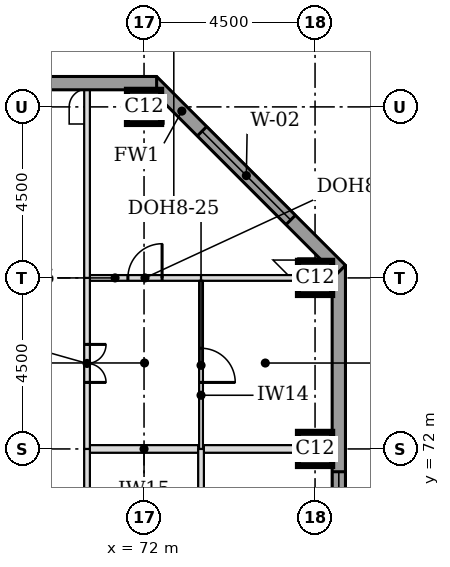
"""IFC4 building model, lengths in metres.
Left out: names, types, materials, properties, quantities, classifications, styles, units other than length and angle.
Written with IfcOpenShell. Run it as: python <this file> out.ifc"""

import sys

from ifc_helpers import new_model, si_unit, direction, frame, frame_2d, origin, origin_2d, place, context, subcontext, project, spatial, rectangle, extrude, element, fill, save


model = new_model("IFC4")
c1 = context("Model", 3, precision=1e-05, world=origin(), true_north=direction((0.0, 1.0)))
c2 = subcontext(c1, "Body", "Model", "MODEL_VIEW")
j1 = project(units=[si_unit("LENGTHUNIT", "METRE"), si_unit("PLANEANGLEUNIT", "RADIAN")], contexts=[c1])
p1 = place(None, origin())
s1 = spatial("IfcSite", under=j1, at=p1, CompositionType="ELEMENT")
p2 = place(p1, origin())
s2 = spatial("IfcBuilding", under=s1, at=p2, CompositionType="ELEMENT")
p3 = place(p2, frame((0.0, 0.0, 199.5)))
s3 = spatial("IfcBuildingStorey", under=s2, at=p3, CompositionType="ELEMENT", Elevation=199.5)
for number, where, z_axis, x_axis in (
    (1, (76.5, 72.0, 0.0), (0.0, 0.0, 1.0), (1.0, 0.0, 0.0)),
    (2, (76.5, 76.5, 0.0), (0.0, 0.0, 1.0), (1.0, 0.0, 0.0)),
    (3, (72.0, 81.0, 0.0), (0.0, 0.0, 1.0), (1.0, 0.0, 0.0)),
):
    element("IfcColumn", number, at=place(p3, frame(where, z_axis=z_axis, x_axis=x_axis)), inside=s3, PredefinedType="COLUMN", context=c2, shape_type="SweptSolid", body=[
        extrude(rectangle(XDim=0.9, YDim=0.9, at=origin_2d()), origin(), (0.0, 0.0, 1.0), 3.7),
    ])
p4 = place(p3, frame((77.125, 44.669, 0.0), z_axis=(0.0, 0.0, 1.0), x_axis=(0.0, 1.0, 0.0)))
e4 = element("IfcWall", 4, at=p4, inside=s3, PredefinedType="STANDARD", context=c2, shape_type="SweptSolid", body=[
    extrude(rectangle(XDim=32.163, YDim=0.35, at=frame_2d((16.081, 0.0))), origin(), (0.0, 0.0, 1.0), 3.525),
])
p5 = place(p4, frame((5.431, 0.0, 0.9)))
e5 = element("IfcOpeningElement", 5, at=p5, cuts=e4, PredefinedType="OPENING", context=c2, shape_type="SweptSolid", body=[
    extrude(rectangle(XDim=3.3, YDim=1.9, at=frame_2d((1.65, 0.95))), frame((0.0, 0.185, 0.0), z_axis=(0.0, -1.0, 0.0), x_axis=(1.0, 0.0, 0.0)), (0.0, 0.0, 1.0), 0.37),
])
p6 = place(p4, frame((9.931, 0.0, 0.9)))
e6 = element("IfcOpeningElement", 6, at=p6, cuts=e4, PredefinedType="OPENING", context=c2, shape_type="SweptSolid", body=[
    extrude(rectangle(XDim=3.3, YDim=1.9, at=frame_2d((1.65, 0.95))), frame((0.0, 0.185, 0.0), z_axis=(0.0, -1.0, 0.0), x_axis=(1.0, 0.0, 0.0)), (0.0, 0.0, 1.0), 0.37),
])
p7 = place(p4, frame((14.431, 0.0, 0.9)))
e7 = element("IfcOpeningElement", 7, at=p7, cuts=e4, PredefinedType="OPENING", context=c2, shape_type="SweptSolid", body=[
    extrude(rectangle(XDim=3.3, YDim=1.9, at=frame_2d((1.65, 0.95))), frame((0.0, 0.185, 0.0), z_axis=(0.0, -1.0, 0.0), x_axis=(1.0, 0.0, 0.0)), (0.0, 0.0, 1.0), 0.37),
])
p8 = place(p4, frame((18.931, 0.0, 0.9)))
e8 = element("IfcOpeningElement", 8, at=p8, cuts=e4, PredefinedType="OPENING", context=c2, shape_type="SweptSolid", body=[
    extrude(rectangle(XDim=3.3, YDim=1.9, at=frame_2d((1.65, 0.95))), frame((0.0, 0.185, 0.0), z_axis=(0.0, -1.0, 0.0), x_axis=(1.0, 0.0, 0.0)), (0.0, 0.0, 1.0), 0.37),
])
p9 = place(p4, frame((23.431, 0.0, 0.9)))
e9 = element("IfcOpeningElement", 9, at=p9, cuts=e4, PredefinedType="OPENING", context=c2, shape_type="SweptSolid", body=[
    extrude(rectangle(XDim=3.3, YDim=1.9, at=frame_2d((1.65, 0.95))), frame((0.0, 0.185, 0.0), z_axis=(0.0, -1.0, 0.0), x_axis=(1.0, 0.0, 0.0)), (0.0, 0.0, 1.0), 0.37),
])
p10 = place(p3, frame((77.176, 76.708, 0.0), z_axis=(0.0, 0.0, 1.0), x_axis=(-0.707106781187, 0.707106781187, 0.0)))
e10 = element("IfcWall", 10, at=p10, inside=s3, PredefinedType="STANDARD", context=c2, shape_type="SweptSolid", body=[
    extrude(rectangle(XDim=7.027, YDim=0.35, at=frame_2d((3.513, 0.0))), origin(), (0.0, 0.0, 1.0), 3.525),
])
p11 = place(p10, frame((1.863, 0.0, 0.9)))
e11 = element("IfcOpeningElement", 11, at=p11, cuts=e10, PredefinedType="OPENING", context=c2, shape_type="SweptSolid", body=[
    extrude(rectangle(XDim=3.3, YDim=1.9, at=frame_2d((1.65, 0.95))), frame((0.0, 0.185, 0.0), z_axis=(0.0, -1.0, 0.0), x_axis=(1.0, 0.0, 0.0)), (0.0, 0.0, 1.0), 0.37),
])
p12 = place(p3, frame((72.331, 81.625, 0.0), z_axis=(0.0, 0.0, 1.0), x_axis=(-1.0, 0.0, 0.0)))
e12 = element("IfcWall", 12, at=p12, inside=s3, PredefinedType="STANDARD", context=c2, shape_type="SweptSolid", body=[
    extrude(rectangle(XDim=32.163, YDim=0.35, at=frame_2d((16.081, 0.0))), origin(), (0.0, 0.0, 1.0), 3.525),
])
p13 = place(p12, frame((5.431, 0.0, 0.9)))
e13 = element("IfcOpeningElement", 13, at=p13, cuts=e12, PredefinedType="OPENING", context=c2, shape_type="SweptSolid", body=[
    extrude(rectangle(XDim=3.3, YDim=1.9, at=frame_2d((1.65, 0.95))), frame((0.0, 0.185, 0.0), z_axis=(0.0, -1.0, 0.0), x_axis=(1.0, 0.0, 0.0)), (0.0, 0.0, 1.0), 0.37),
])
p14 = place(p12, frame((9.931, 0.0, 0.9)))
e14 = element("IfcOpeningElement", 14, at=p14, cuts=e12, PredefinedType="OPENING", context=c2, shape_type="SweptSolid", body=[
    extrude(rectangle(XDim=3.3, YDim=1.9, at=frame_2d((1.65, 0.95))), frame((0.0, 0.185, 0.0), z_axis=(0.0, -1.0, 0.0), x_axis=(1.0, 0.0, 0.0)), (0.0, 0.0, 1.0), 0.37),
])
p15 = place(p12, frame((14.431, 0.0, 0.9)))
e15 = element("IfcOpeningElement", 15, at=p15, cuts=e12, PredefinedType="OPENING", context=c2, shape_type="SweptSolid", body=[
    extrude(rectangle(XDim=3.3, YDim=1.9, at=frame_2d((1.65, 0.95))), frame((0.0, 0.185, 0.0), z_axis=(0.0, -1.0, 0.0), x_axis=(1.0, 0.0, 0.0)), (0.0, 0.0, 1.0), 0.37),
])
p16 = place(p12, frame((18.931, 0.0, 0.9)))
e16 = element("IfcOpeningElement", 16, at=p16, cuts=e12, PredefinedType="OPENING", context=c2, shape_type="SweptSolid", body=[
    extrude(rectangle(XDim=3.3, YDim=1.9, at=frame_2d((1.65, 0.95))), frame((0.0, 0.185, 0.0), z_axis=(0.0, -1.0, 0.0), x_axis=(1.0, 0.0, 0.0)), (0.0, 0.0, 1.0), 0.37),
])
p17 = place(p12, frame((23.431, 0.0, 0.9)))
e17 = element("IfcOpeningElement", 17, at=p17, cuts=e12, PredefinedType="OPENING", context=c2, shape_type="SweptSolid", body=[
    extrude(rectangle(XDim=3.3, YDim=1.9, at=frame_2d((1.65, 0.95))), frame((0.0, 0.185, 0.0), z_axis=(0.0, -1.0, 0.0), x_axis=(1.0, 0.0, 0.0)), (0.0, 0.0, 1.0), 0.37),
])
p18 = place(p3, frame((70.575, 72.0, 0.0), z_axis=(0.0, 0.0, 1.0), x_axis=(1.0, 0.0, 0.0)))
e18 = element("IfcWall", 18, at=p18, inside=s3, PredefinedType="PARTITIONING", context=c2, shape_type="SweptSolid", body=[
    extrude(rectangle(XDim=2.85, YDim=0.2, at=frame_2d((1.425, 0.0))), origin(), (0.0, 0.0, 1.0), 3.55),
])
p19 = place(p3, frame((73.575, 72.0, 0.0), z_axis=(0.0, 0.0, 1.0), x_axis=(1.0, 0.0, 0.0)))
e19 = element("IfcWall", 19, at=p19, inside=s3, PredefinedType="PARTITIONING", context=c2, shape_type="SweptSolid", body=[
    extrude(rectangle(XDim=3.375, YDim=0.2, at=frame_2d((1.688, 0.0))), origin(), (0.0, 0.0, 1.0), 3.55),
])
p20 = place(p3, frame((70.575, 76.5, 0.0), z_axis=(0.0, 0.0, 1.0), x_axis=(1.0, 0.0, 0.0)))
e20 = element("IfcWall", 20, at=p20, inside=s3, PredefinedType="PARTITIONING", context=c2, shape_type="SweptSolid", body=[
    extrude(rectangle(XDim=2.925, YDim=0.15, at=frame_2d((1.462, 0.0))), origin(), (0.0, 0.0, 1.0), 3.096),
])
p21 = place(p20, frame((1.0, 0.0, 0.0)))
e21 = element("IfcOpeningElement", 21, at=p21, cuts=e20, PredefinedType="OPENING", context=c2, shape_type="SweptSolid", body=[
    extrude(rectangle(XDim=0.9, YDim=2.1, at=frame_2d((0.45, 1.05))), frame((0.0, 0.085, 0.0), z_axis=(0.0, -1.0, 0.0), x_axis=(1.0, 0.0, 0.0)), (0.0, 0.0, 1.0), 0.17),
])
p22 = place(p3, frame((73.5, 76.5, 0.0), z_axis=(0.0, 0.0, 1.0), x_axis=(1.0, 0.0, 0.0)))
e22 = element("IfcWall", 22, at=p22, inside=s3, PredefinedType="PARTITIONING", context=c2, shape_type="SweptSolid", body=[
    extrude(rectangle(XDim=2.55, YDim=0.15, at=frame_2d((1.275, 0.0))), origin(), (0.0, 0.0, 1.0), 3.096),
])
for number, where, z_axis, x_axis in (
    (23, (70.5, 69.0, 0.0), (0.0, 0.0, 1.0), (0.0, 1.0, 0.0)),
    (24, (73.5, 69.0, 0.0), (0.0, 0.0, 1.0), (0.0, 1.0, 0.0)),
):
    element("IfcWall", number, at=place(p3, frame(where, z_axis=z_axis, x_axis=x_axis)), inside=s3, PredefinedType="PARTITIONING", context=c2, shape_type="SweptSolid", body=[
        extrude(rectangle(XDim=3.0, YDim=0.15, at=frame_2d((1.5, 0.0))), origin(), (0.0, 0.0, 1.0), 3.55),
    ])
p23 = place(p3, frame((70.5, 72.0, 0.0), z_axis=(0.0, 0.0, 1.0), x_axis=(0.0, 1.0, 0.0)))
e25 = element("IfcWall", 25, at=p23, inside=s3, PredefinedType="PARTITIONING", context=c2, shape_type="SweptSolid", body=[
    extrude(rectangle(XDim=4.5, YDim=0.15, at=frame_2d((2.25, 0.0))), origin(), (0.0, 0.0, 1.0), 3.55),
])
p24 = place(p23, frame((1.75, 0.0, 0.0)))
e26 = element("IfcOpeningElement", 26, at=p24, cuts=e25, PredefinedType="OPENING", context=c2, shape_type="SweptSolid", body=[
    extrude(rectangle(XDim=1.0, YDim=2.1, at=frame_2d((0.5, 1.05))), frame((0.0, 0.085, 0.0), z_axis=(0.0, -1.0, 0.0), x_axis=(1.0, 0.0, 0.0)), (0.0, 0.0, 1.0), 0.17),
])
p25 = place(p3, frame((73.5, 72.0, 0.0), z_axis=(0.0, 0.0, 1.0), x_axis=(0.0, 1.0, 0.0)))
e27 = element("IfcWall", 27, at=p25, inside=s3, PredefinedType="PARTITIONING", context=c2, shape_type="SweptSolid", body=[
    extrude(rectangle(XDim=4.425, YDim=0.1, at=frame_2d((2.212, 0.0))), origin(), (0.0, 0.0, 1.0), 3.55),
])
p26 = place(p25, frame((1.75, 0.0, 0.0)))
e28 = element("IfcOpeningElement", 28, at=p26, cuts=e27, PredefinedType="OPENING", context=c2, shape_type="SweptSolid", body=[
    extrude(rectangle(XDim=0.9, YDim=2.1, at=frame_2d((0.45, 1.05))), frame((0.0, 0.06, 0.0), z_axis=(0.0, -1.0, 0.0), x_axis=(1.0, 0.0, 0.0)), (0.0, 0.0, 1.0), 0.12),
])
p27 = place(p3, frame((70.5, 76.5, 0.0), z_axis=(0.0, 0.0, 1.0), x_axis=(0.0, 1.0, 0.0)))
e29 = element("IfcWall", 29, at=p27, inside=s3, PredefinedType="PARTITIONING", context=c2, shape_type="SweptSolid", body=[
    extrude(rectangle(XDim=4.95, YDim=0.15, at=frame_2d((2.475, 0.0))), origin(), (0.0, 0.0, 1.0), 3.55),
])
p28 = place(p9, origin())
e30 = element("IfcWindow", 30, at=p28, inside=s3, PartitioningType="SINGLE_PANEL", PredefinedType="WINDOW", context=c2, shape_type="SweptSolid", body=[
    extrude(rectangle(XDim=3.3, YDim=1.9, at=frame_2d((1.65, 0.95))), frame((0.0, 0.085, 0.0), z_axis=(0.0, -1.0, 0.0), x_axis=(1.0, 0.0, 0.0)), (0.0, 0.0, 1.0), 0.06),
])
fill(e9, e30)
p29 = place(p11, origin())
e31 = element("IfcWindow", 31, at=p29, inside=s3, PartitioningType="SINGLE_PANEL", PredefinedType="WINDOW", context=c2, shape_type="SweptSolid", body=[
    extrude(rectangle(XDim=3.3, YDim=1.9, at=frame_2d((1.65, 0.95))), frame((0.0, 0.085, 0.0), z_axis=(0.0, -1.0, 0.0), x_axis=(1.0, 0.0, 0.0)), (0.0, 0.0, 1.0), 0.06),
])
fill(e11, e31)
p30 = place(p24, frame((1.0, 0.0, 0.0), z_axis=(0.0, 0.0, 1.0), x_axis=(-1.0, 0.0, 0.0)))
e32 = element("IfcDoor", 32, at=p30, inside=s3, OperationType="DOUBLE_DOOR_SINGLE_SWING", PredefinedType="DOOR", context=c2, shape_type="SweptSolid", body=[
    extrude(rectangle(XDim=1.0, YDim=2.1, at=frame_2d((0.5, 1.05))), frame((0.0, 0.025, 0.0), z_axis=(0.0, -1.0, 0.0), x_axis=(1.0, 0.0, 0.0)), (0.0, 0.0, 1.0), 0.05),
])
fill(e26, e32)
p31 = place(p26, frame((0.9, 0.0, 0.0), z_axis=(0.0, 0.0, 1.0), x_axis=(-1.0, 0.0, 0.0)))
e33 = element("IfcDoor", 33, at=p31, inside=s3, OperationType="SINGLE_SWING_RIGHT", PredefinedType="DOOR", context=c2, shape_type="SweptSolid", body=[
    extrude(rectangle(XDim=0.9, YDim=2.1, at=frame_2d((0.45, 1.05))), frame((0.0, 0.025, 0.0), z_axis=(0.0, -1.0, 0.0), x_axis=(1.0, 0.0, 0.0)), (0.0, 0.0, 1.0), 0.05),
])
fill(e28, e33)
p32 = place(p21, origin())
e34 = element("IfcDoor", 34, at=p32, inside=s3, OperationType="SINGLE_SWING_RIGHT", PredefinedType="DOOR", context=c2, shape_type="SweptSolid", body=[
    extrude(rectangle(XDim=0.9, YDim=2.1, at=frame_2d((0.45, 1.05))), frame((0.0, 0.025, 0.0), z_axis=(0.0, -1.0, 0.0), x_axis=(1.0, 0.0, 0.0)), (0.0, 0.0, 1.0), 0.05),
])
fill(e21, e34)
save(model, sys.argv[1])
